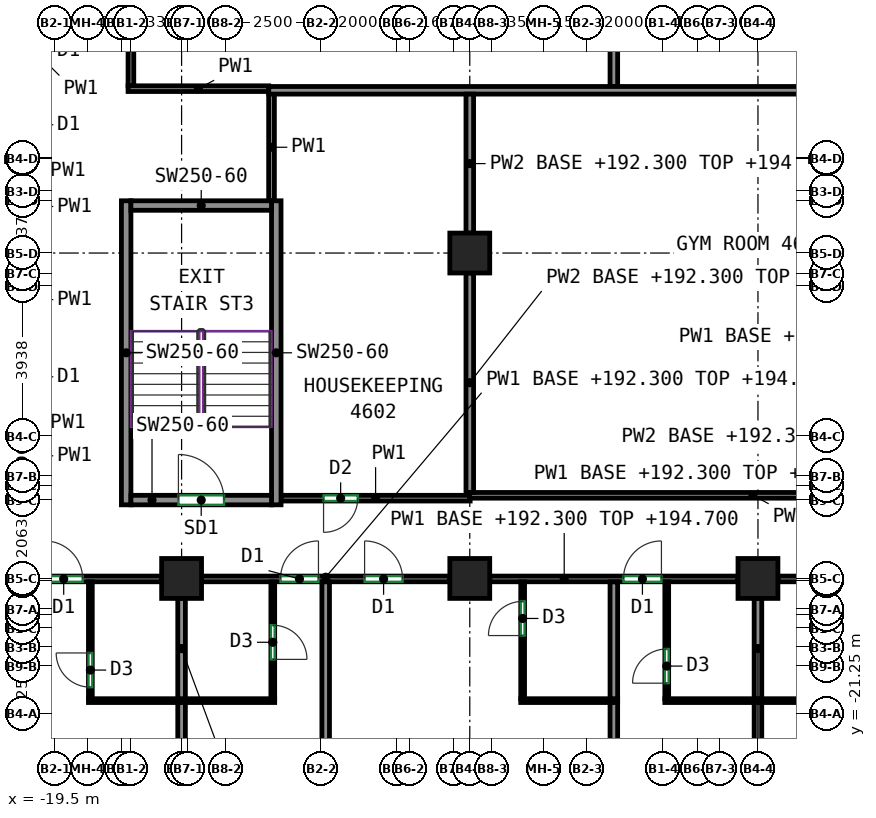
"""IFC4 building model, lengths in metres.
Left out: names, types, materials, properties, quantities, classifications, styles, units other than length and angle.
Written with IfcOpenShell. Run it as: python <this file> out.ifc"""

import sys

from ifc_helpers import new_model, si_unit, direction, frame, frame_2d, origin, origin_2d, place, context, subcontext, project, spatial, rectangle, extrude, source, transform, mapped, element, fill, save


model = new_model("IFC4")
c1 = context("Model", 3, precision=1e-05, world=origin(), true_north=direction((0.0, 1.0)))
c2 = subcontext(c1, "Body", "Model", "MODEL_VIEW")
j1 = project(units=[si_unit("LENGTHUNIT", "METRE"), si_unit("PLANEANGLEUNIT", "RADIAN")], contexts=[c1])
p1 = place(None, origin())
s1 = spatial("IfcSite", under=j1, at=p1, CompositionType="ELEMENT")
p2 = place(p1, origin())
s2 = spatial("IfcBuilding", under=s1, at=p2, CompositionType="ELEMENT")
p3 = place(p2, frame((0.0, 0.0, 192.3)))
s3 = spatial("IfcBuildingStorey", under=s2, at=p3, CompositionType="ELEMENT", Elevation=192.3)
m1 = source(origin(), c2, "Body", "SweptSolid", [
    extrude(rectangle(XDim=1.05, YDim=1.05, at=origin_2d()), origin(), (0.0, 0.0, 1.0), 3.0),
])
for number, where, z_axis, x_axis in (
    (1, (-16.167, -17.688, 0.0), (0.0, 0.0, 1.0), (1.0, 0.0, 0.0)),
    (2, (-8.583, -17.688, 0.0), (0.0, 0.0, 1.0), (1.0, 0.0, 0.0)),
    (3, (-8.583, -9.125, 0.0), (0.0, 0.0, 1.0), (1.0, 0.0, 0.0)),
    (4, (-1.0, -17.688, 0.0), (0.0, 0.0, 1.0), (1.0, 0.0, 0.0)),
):
    element("IfcColumn", number, at=place(p3, frame(where, z_axis=z_axis, x_axis=x_axis)), inside=s3, PredefinedType="COLUMN", context=c2, shape_type="MappedRepresentation", body=[
        mapped(m1, transform((0.0, 0.0, 0.0))),
    ])
m2 = source(origin(), c2, "Body", "SweptSolid", [
    extrude(rectangle(XDim=8.0, YDim=0.25, at=frame_2d((4.0, 0.0))), origin(), (0.0, 0.0, 1.0), 3.0),
])
for number, where, z_axis, x_axis in (
    (5, (-17.625, -15.75, 0.0), (0.0, 0.0, 1.0), (0.0, 1.0, 0.0)),
    (6, (-13.675, -15.75, 0.0), (0.0, 0.0, 1.0), (0.0, 1.0, 0.0)),
):
    element("IfcWall", number, at=place(p3, frame(where, z_axis=z_axis, x_axis=x_axis)), inside=s3, PredefinedType="SHEAR", context=c2, shape_type="MappedRepresentation", body=[
        mapped(m2, transform((0.0, 0.0, 0.0))),
    ])
m3 = source(origin(), c2, "Body", "SweptSolid", [
    extrude(rectangle(XDim=3.7, YDim=0.25, at=frame_2d((1.85, 0.0))), origin(), (0.0, 0.0, 1.0), 3.0),
])
p4 = place(p3, frame((-17.5, -15.625, 0.0), z_axis=(0.0, 0.0, 1.0), x_axis=(1.0, 0.0, 0.0)))
e7 = element("IfcWall", 7, at=p4, inside=s3, PredefinedType="SHEAR", context=c2, shape_type="MappedRepresentation", body=[
    mapped(m3, transform((0.0, 0.0, 0.0))),
])
p5 = place(p4, frame((1.25, 0.0, 0.0)))
e8 = element("IfcOpeningElement", 8, at=p5, cuts=e7, PredefinedType="OPENING", context=c2, shape_type="SweptSolid", body=[
    extrude(rectangle(XDim=1.2, YDim=2.1, at=frame_2d((0.6, 1.05))), frame((0.0, 0.135, 0.0), z_axis=(0.0, -1.0, 0.0), x_axis=(1.0, 0.0, 0.0)), (0.0, 0.0, 1.0), 0.27),
])
p6 = place(p3, frame((-17.5, -7.875, 0.0), z_axis=(0.0, 0.0, 1.0), x_axis=(1.0, 0.0, 0.0)))
e9 = element("IfcWall", 9, at=p6, inside=s3, PredefinedType="SHEAR", context=c2, shape_type="MappedRepresentation", body=[
    mapped(m3, transform((0.0, 0.0, 0.0))),
])
p7 = place(p3, frame((-23.75, -17.7, 0.0), z_axis=(0.0, 0.0, 1.0), x_axis=(1.0, 0.0, 0.0)))
e10 = element("IfcWall", 10, at=p7, inside=s3, PredefinedType="PARTITIONING", context=c2, shape_type="SweptSolid", body=[
    extrude(rectangle(XDim=7.058, YDim=0.15, at=frame_2d((3.529, 0.0))), origin(), (0.0, 0.0, 1.0), 2.4),
])
p8 = place(p7, frame((0.201, 0.0, 0.0)))
e11 = element("IfcOpeningElement", 11, at=p8, cuts=e10, PredefinedType="OPENING", context=c2, shape_type="SweptSolid", body=[
    extrude(rectangle(XDim=1.0, YDim=2.1, at=frame_2d((0.5, 1.05))), frame((0.0, 0.085, 0.0), z_axis=(0.0, -1.0, 0.0), x_axis=(1.0, 0.0, 0.0)), (0.0, 0.0, 1.0), 0.17),
])
p9 = place(p7, frame((3.981, 0.0, 0.0)))
e12 = element("IfcOpeningElement", 12, at=p9, cuts=e10, PredefinedType="OPENING", context=c2, shape_type="SweptSolid", body=[
    extrude(rectangle(XDim=1.0, YDim=2.1, at=frame_2d((0.5, 1.05))), frame((0.0, 0.085, 0.0), z_axis=(0.0, -1.0, 0.0), x_axis=(1.0, 0.0, 0.0)), (0.0, 0.0, 1.0), 0.17),
])
p10 = place(p3, frame((-15.642, -17.7, 0.0), z_axis=(0.0, 0.0, 1.0), x_axis=(1.0, 0.0, 0.0)))
e13 = element("IfcWall", 13, at=p10, inside=s3, PredefinedType="PARTITIONING", context=c2, shape_type="SweptSolid", body=[
    extrude(rectangle(XDim=6.534, YDim=0.15, at=frame_2d((3.267, 0.0))), origin(), (0.0, 0.0, 1.0), 2.4),
])
p11 = place(p10, frame((2.077, 0.0, 0.0)))
e14 = element("IfcOpeningElement", 14, at=p11, cuts=e13, PredefinedType="OPENING", context=c2, shape_type="SweptSolid", body=[
    extrude(rectangle(XDim=1.0, YDim=2.1, at=frame_2d((0.5, 1.05))), frame((0.0, 0.085, 0.0), z_axis=(0.0, -1.0, 0.0), x_axis=(1.0, 0.0, 0.0)), (0.0, 0.0, 1.0), 0.17),
])
p12 = place(p10, frame((4.291, 0.0, 0.0)))
e15 = element("IfcOpeningElement", 15, at=p12, cuts=e13, PredefinedType="OPENING", context=c2, shape_type="SweptSolid", body=[
    extrude(rectangle(XDim=1.0, YDim=2.1, at=frame_2d((0.5, 1.05))), frame((0.0, 0.085, 0.0), z_axis=(0.0, -1.0, 0.0), x_axis=(1.0, 0.0, 0.0)), (0.0, 0.0, 1.0), 0.17),
])
p13 = place(p3, frame((-8.058, -17.7, 0.0), z_axis=(0.0, 0.0, 1.0), x_axis=(1.0, 0.0, 0.0)))
e16 = element("IfcWall", 16, at=p13, inside=s3, PredefinedType="PARTITIONING", context=c2, shape_type="SweptSolid", body=[
    extrude(rectangle(XDim=6.533, YDim=0.15, at=frame_2d((3.267, 0.0))), origin(), (0.0, 0.0, 1.0), 2.4),
])
p14 = place(p13, frame((3.518, 0.0, 0.0)))
e17 = element("IfcOpeningElement", 17, at=p14, cuts=e16, PredefinedType="OPENING", context=c2, shape_type="SweptSolid", body=[
    extrude(rectangle(XDim=1.0, YDim=2.1, at=frame_2d((0.5, 1.05))), frame((0.0, 0.085, 0.0), z_axis=(0.0, -1.0, 0.0), x_axis=(1.0, 0.0, 0.0)), (0.0, 0.0, 1.0), 0.17),
])
p15 = place(p3, frame((-0.475, -17.7, 0.0), z_axis=(0.0, 0.0, 1.0), x_axis=(1.0, 0.0, 0.0)))
e18 = element("IfcWall", 18, at=p15, inside=s3, PredefinedType="PARTITIONING", context=c2, shape_type="SweptSolid", body=[
    extrude(rectangle(XDim=6.533, YDim=0.15, at=frame_2d((3.267, 0.0))), origin(), (0.0, 0.0, 1.0), 2.4),
])
p16 = place(p15, frame((2.147, 0.0, 0.0)))
e19 = element("IfcOpeningElement", 19, at=p16, cuts=e18, PredefinedType="OPENING", context=c2, shape_type="SweptSolid", body=[
    extrude(rectangle(XDim=1.0, YDim=2.1, at=frame_2d((0.5, 1.05))), frame((0.0, 0.085, 0.0), z_axis=(0.0, -1.0, 0.0), x_axis=(1.0, 0.0, 0.0)), (0.0, 0.0, 1.0), 0.17),
])
p17 = place(p15, frame((3.468, 0.0, 0.0)))
e20 = element("IfcOpeningElement", 20, at=p17, cuts=e18, PredefinedType="OPENING", context=c2, shape_type="SweptSolid", body=[
    extrude(rectangle(XDim=1.0, YDim=2.1, at=frame_2d((0.5, 1.05))), frame((0.0, 0.085, 0.0), z_axis=(0.0, -1.0, 0.0), x_axis=(1.0, 0.0, 0.0)), (0.0, 0.0, 1.0), 0.17),
])
p18 = place(p3, frame((-17.5, -4.725, 0.0), z_axis=(0.0, 0.0, 1.0), x_axis=(0.0, 1.0, 0.0)))
e21 = element("IfcWall", 21, at=p18, inside=s3, PredefinedType="PARTITIONING", context=c2, shape_type="SweptSolid", body=[
    extrude(rectangle(XDim=8.35, YDim=0.15, at=frame_2d((4.175, 0.0))), origin(), (0.0, 0.0, 1.0), 3.0),
])
p19 = place(p3, frame((-17.575, -4.8, 0.0), z_axis=(0.0, 0.0, 1.0), x_axis=(1.0, 0.0, 0.0)))
e22 = element("IfcWall", 22, at=p19, inside=s3, PredefinedType="PARTITIONING", context=c2, shape_type="SweptSolid", body=[
    extrude(rectangle(XDim=3.702, YDim=0.15, at=frame_2d((1.851, 0.0))), origin(), (0.0, 0.0, 1.0), 3.0),
])
p20 = place(p3, frame((-13.8, -7.75, 0.0), z_axis=(0.0, 0.0, 1.0), x_axis=(0.0, 1.0, 0.0)))
e23 = element("IfcWall", 23, at=p20, inside=s3, PredefinedType="PARTITIONING", context=c2, shape_type="SweptSolid", body=[
    extrude(rectangle(XDim=2.817, YDim=0.15, at=frame_2d((1.408, 0.0))), origin(), (0.0, 0.0, 1.0), 3.0),
])
p21 = place(p3, frame((-8.573, -15.575, 0.0), z_axis=(0.0, 0.0, 1.0), x_axis=(-1.0, 0.0, 0.0)))
e24 = element("IfcWall", 24, at=p21, inside=s3, PredefinedType="PARTITIONING", context=c2, shape_type="SweptSolid", body=[
    extrude(rectangle(XDim=4.977, YDim=0.15, at=frame_2d((2.489, 0.0))), origin(), (0.0, 0.0, 1.0), 3.0),
])
p22 = place(p21, frame((2.958, 0.0, 0.0)))
e25 = element("IfcOpeningElement", 25, at=p22, cuts=e24, PredefinedType="OPENING", context=c2, shape_type="SweptSolid", body=[
    extrude(rectangle(XDim=0.9, YDim=2.1, at=frame_2d((0.45, 1.05))), frame((0.0, 0.085, 0.0), z_axis=(0.0, -1.0, 0.0), x_axis=(1.0, 0.0, 0.0)), (0.0, 0.0, 1.0), 0.17),
])
p23 = place(p3, frame((-8.593, -15.5, 0.0), z_axis=(0.0, 0.0, 1.0), x_axis=(1.0, 0.0, 0.0)))
e26 = element("IfcWall", 26, at=p23, inside=s3, PredefinedType="PARTITIONING", context=c2, shape_type="SweptSolid", body=[
    extrude(rectangle(XDim=24.868, YDim=0.15, at=frame_2d((12.434, 0.0))), origin(), (0.0, 0.0, 1.0), 3.0),
])
p24 = place(p23, frame((11.973, 0.0, 0.0)))
e27 = element("IfcOpeningElement", 27, at=p24, cuts=e26, PredefinedType="OPENING", context=c2, shape_type="SweptSolid", body=[
    extrude(rectangle(XDim=0.9, YDim=2.1, at=frame_2d((0.45, 1.05))), frame((0.0, 0.085, 0.0), z_axis=(0.0, -1.0, 0.0), x_axis=(1.0, 0.0, 0.0)), (0.0, 0.0, 1.0), 0.17),
])
p25 = place(p3, frame((-18.567, -20.852, 0.0), z_axis=(0.0, 0.0, 1.0), x_axis=(0.0, 1.0, 0.0)))
e28 = element("IfcWall", 28, at=p25, inside=s3, PredefinedType="PARTITIONING", context=c2, shape_type="SweptSolid", body=[
    extrude(rectangle(XDim=3.075, YDim=0.1, at=frame_2d((1.538, 0.0))), origin(), (0.0, 0.0, 1.0), 3.0),
])
p26 = place(p25, frame((0.304, 0.0, 0.0)))
e29 = element("IfcOpeningElement", 29, at=p26, cuts=e28, PredefinedType="OPENING", context=c2, shape_type="SweptSolid", body=[
    extrude(rectangle(XDim=0.9, YDim=2.1, at=frame_2d((0.45, 1.05))), frame((0.0, 0.06, 0.0), z_axis=(0.0, -1.0, 0.0), x_axis=(1.0, 0.0, 0.0)), (0.0, 0.0, 1.0), 0.12),
])
p27 = place(p3, frame((-18.617, -20.902, 0.0), z_axis=(0.0, 0.0, 1.0), x_axis=(1.0, 0.0, 0.0)))
e30 = element("IfcWall", 30, at=p27, inside=s3, PredefinedType="PARTITIONING", context=c2, shape_type="SweptSolid", body=[
    extrude(rectangle(XDim=4.9, YDim=0.1, at=frame_2d((2.45, 0.0))), origin(), (0.0, 0.0, 1.0), 3.0),
])
p28 = place(p3, frame((-16.167, -25.4, 0.0), z_axis=(0.0, 0.0, 1.0), x_axis=(0.0, 1.0, 0.0)))
e31 = element("IfcWall", 31, at=p28, inside=s3, PredefinedType="PARTITIONING", context=c2, shape_type="SweptSolid", body=[
    extrude(rectangle(XDim=4.448, YDim=0.2, at=frame_2d((2.224, 0.0))), origin(), (0.0, 0.0, 1.0), 2.4),
])
p29 = place(p3, frame((-16.167, -20.852, 0.0), z_axis=(0.0, 0.0, 1.0), x_axis=(0.0, 1.0, 0.0)))
e32 = element("IfcWall", 32, at=p29, inside=s3, PredefinedType="PARTITIONING", context=c2, shape_type="SweptSolid", body=[
    extrude(rectangle(XDim=2.64, YDim=0.2, at=frame_2d((1.32, 0.0))), origin(), (0.0, 0.0, 1.0), 2.4),
])
p30 = place(p3, frame((-13.767, -17.777, 0.0), z_axis=(0.0, 0.0, 1.0), x_axis=(0.0, -1.0, 0.0)))
e33 = element("IfcWall", 33, at=p30, inside=s3, PredefinedType="PARTITIONING", context=c2, shape_type="SweptSolid", body=[
    extrude(rectangle(XDim=3.075, YDim=0.1, at=frame_2d((1.538, 0.0))), origin(), (0.0, 0.0, 1.0), 3.0),
])
p31 = place(p30, frame((1.14, 0.0, 0.0)))
e34 = element("IfcOpeningElement", 34, at=p31, cuts=e33, PredefinedType="OPENING", context=c2, shape_type="SweptSolid", body=[
    extrude(rectangle(XDim=0.9, YDim=2.1, at=frame_2d((0.45, 1.05))), frame((0.0, 0.06, 0.0), z_axis=(0.0, -1.0, 0.0), x_axis=(1.0, 0.0, 0.0)), (0.0, 0.0, 1.0), 0.12),
])
p32 = place(p3, frame((-12.375, -26.0, 0.0), z_axis=(0.0, 0.0, 1.0), x_axis=(0.0, 1.0, 0.0)))
e35 = element("IfcWall", 35, at=p32, inside=s3, PredefinedType="PARTITIONING", context=c2, shape_type="SweptSolid", body=[
    extrude(rectangle(XDim=8.223, YDim=0.2, at=frame_2d((4.111, 0.0))), origin(), (0.0, 0.0, 1.0), 3.0),
])
p33 = place(p3, frame((-7.192, -20.852, 0.0), z_axis=(0.0, 0.0, 1.0), x_axis=(0.0, 1.0, 0.0)))
e36 = element("IfcWall", 36, at=p33, inside=s3, PredefinedType="PARTITIONING", context=c2, shape_type="SweptSolid", body=[
    extrude(rectangle(XDim=3.075, YDim=0.1, at=frame_2d((1.538, 0.0))), origin(), (0.0, 0.0, 1.0), 3.0),
])
p34 = place(p33, frame((1.662, 0.0, 0.0)))
e37 = element("IfcOpeningElement", 37, at=p34, cuts=e36, PredefinedType="OPENING", context=c2, shape_type="SweptSolid", body=[
    extrude(rectangle(XDim=0.9, YDim=2.1, at=frame_2d((0.45, 1.05))), frame((0.0, 0.06, 0.0), z_axis=(0.0, -1.0, 0.0), x_axis=(1.0, 0.0, 0.0)), (0.0, 0.0, 1.0), 0.12),
])
p35 = place(p3, frame((-7.242, -20.902, 0.0), z_axis=(0.0, 0.0, 1.0), x_axis=(1.0, 0.0, 0.0)))
e38 = element("IfcWall", 38, at=p35, inside=s3, PredefinedType="PARTITIONING", context=c2, shape_type="SweptSolid", body=[
    extrude(rectangle(XDim=2.55, YDim=0.1, at=frame_2d((1.275, 0.0))), origin(), (0.0, 0.0, 1.0), 3.0),
])
p36 = place(p3, frame((-4.792, -26.0, 0.0), z_axis=(0.0, 0.0, 1.0), x_axis=(0.0, 1.0, 0.0)))
e39 = element("IfcWall", 39, at=p36, inside=s3, PredefinedType="PARTITIONING", context=c2, shape_type="SweptSolid", body=[
    extrude(rectangle(XDim=5.048, YDim=0.2, at=frame_2d((2.524, 0.0))), origin(), (0.0, 0.0, 1.0), 3.0),
])
p37 = place(p3, frame((-4.792, -20.852, 0.0), z_axis=(0.0, 0.0, 1.0), x_axis=(0.0, 1.0, 0.0)))
e40 = element("IfcWall", 40, at=p37, inside=s3, PredefinedType="PARTITIONING", context=c2, shape_type="SweptSolid", body=[
    extrude(rectangle(XDim=3.075, YDim=0.2, at=frame_2d((1.538, 0.0))), origin(), (0.0, 0.0, 1.0), 3.0),
])
p38 = place(p3, frame((-3.4, -20.852, 0.0), z_axis=(0.0, 0.0, 1.0), x_axis=(0.0, 1.0, 0.0)))
e41 = element("IfcWall", 41, at=p38, inside=s3, PredefinedType="PARTITIONING", context=c2, shape_type="SweptSolid", body=[
    extrude(rectangle(XDim=3.075, YDim=0.1, at=frame_2d((1.538, 0.0))), origin(), (0.0, 0.0, 1.0), 3.0),
])
p39 = place(p38, frame((0.409, 0.0, 0.0)))
e42 = element("IfcOpeningElement", 42, at=p39, cuts=e41, PredefinedType="OPENING", context=c2, shape_type="SweptSolid", body=[
    extrude(rectangle(XDim=0.9, YDim=2.1, at=frame_2d((0.45, 1.05))), frame((0.0, 0.06, 0.0), z_axis=(0.0, -1.0, 0.0), x_axis=(1.0, 0.0, 0.0)), (0.0, 0.0, 1.0), 0.12),
])
p40 = place(p3, frame((-3.45, -20.902, 0.0), z_axis=(0.0, 0.0, 1.0), x_axis=(1.0, 0.0, 0.0)))
e43 = element("IfcWall", 43, at=p40, inside=s3, PredefinedType="PARTITIONING", context=c2, shape_type="SweptSolid", body=[
    extrude(rectangle(XDim=4.9, YDim=0.1, at=frame_2d((2.45, 0.0))), origin(), (0.0, 0.0, 1.0), 3.0),
])
p41 = place(p3, frame((-1.0, -25.4, 0.0), z_axis=(0.0, 0.0, 1.0), x_axis=(0.0, 1.0, 0.0)))
e44 = element("IfcWall", 44, at=p41, inside=s3, PredefinedType="PARTITIONING", context=c2, shape_type="SweptSolid", body=[
    extrude(rectangle(XDim=4.448, YDim=0.2, at=frame_2d((2.224, 0.0))), origin(), (0.0, 0.0, 1.0), 2.4),
])
p42 = place(p3, frame((-1.0, -20.852, 0.0), z_axis=(0.0, 0.0, 1.0), x_axis=(0.0, 1.0, 0.0)))
e45 = element("IfcWall", 45, at=p42, inside=s3, PredefinedType="PARTITIONING", context=c2, shape_type="SweptSolid", body=[
    extrude(rectangle(XDim=2.64, YDim=0.2, at=frame_2d((1.32, 0.0))), origin(), (0.0, 0.0, 1.0), 2.4),
])
p43 = place(p3, frame((-4.792, -4.743, 0.0), z_axis=(0.0, 0.0, 1.0), x_axis=(0.0, 1.0, 0.0)))
e46 = element("IfcWall", 46, at=p43, inside=s3, PredefinedType="PARTITIONING", context=c2, shape_type="SweptSolid", body=[
    extrude(rectangle(XDim=8.366, YDim=0.2, at=frame_2d((4.183, 0.0))), origin(), (0.0, 0.0, 1.0), 3.0),
])
p44 = place(p3, frame((-13.873, -4.843, 0.0), z_axis=(0.0, 0.0, 1.0), x_axis=(1.0, 0.0, 0.0)))
e47 = element("IfcWall", 47, at=p44, inside=s3, PredefinedType="PARTITIONING", context=c2, shape_type="SweptSolid", body=[
    extrude(rectangle(XDim=30.146, YDim=0.2, at=frame_2d((15.073, 0.0))), origin(), (0.0, 0.0, 1.0), 3.0),
])
p45 = place(p3, frame((-8.583, -8.6, 0.0), z_axis=(0.0, 0.0, 1.0), x_axis=(0.0, 1.0, 0.0)))
e48 = element("IfcWall", 48, at=p45, inside=s3, PredefinedType="PARTITIONING", context=c2, shape_type="SweptSolid", body=[
    extrude(rectangle(XDim=3.657, YDim=0.2, at=frame_2d((1.829, 0.0))), origin(), (0.0, 0.0, 1.0), 2.4),
])
p46 = place(p3, frame((-8.583, -15.423, 0.0), z_axis=(0.0, 0.0, 1.0), x_axis=(0.0, 1.0, 0.0)))
e49 = element("IfcWall", 49, at=p46, inside=s3, PredefinedType="PARTITIONING", context=c2, shape_type="SweptSolid", body=[
    extrude(rectangle(XDim=5.773, YDim=0.2, at=frame_2d((2.887, 0.0))), origin(), (0.0, 0.0, 1.0), 2.4),
])
p47 = place(p5, origin())
e50 = element("IfcDoor", 50, at=p47, inside=s3, OperationType="DOUBLE_DOOR_SINGLE_SWING", PredefinedType="DOOR", context=c2, shape_type="SweptSolid", body=[
    extrude(rectangle(XDim=1.2, YDim=2.1, at=frame_2d((0.6, 1.05))), frame((0.0, 0.025, 0.0), z_axis=(0.0, -1.0, 0.0), x_axis=(1.0, 0.0, 0.0)), (0.0, 0.0, 1.0), 0.05),
])
fill(e8, e50)
p48 = place(p26, origin())
e51 = element("IfcDoor", 51, at=p48, inside=s3, OperationType="SINGLE_SWING_RIGHT", PredefinedType="DOOR", context=c2, shape_type="SweptSolid", body=[
    extrude(rectangle(XDim=0.9, YDim=2.1, at=frame_2d((0.45, 1.05))), frame((0.0, 0.025, 0.0), z_axis=(0.0, -1.0, 0.0), x_axis=(1.0, 0.0, 0.0)), (0.0, 0.0, 1.0), 0.05),
])
fill(e29, e51)
p49 = place(p39, origin())
e52 = element("IfcDoor", 52, at=p49, inside=s3, OperationType="SINGLE_SWING_LEFT", PredefinedType="DOOR", context=c2, shape_type="SweptSolid", body=[
    extrude(rectangle(XDim=0.9, YDim=2.1, at=frame_2d((0.45, 1.05))), frame((0.0, 0.025, 0.0), z_axis=(0.0, -1.0, 0.0), x_axis=(1.0, 0.0, 0.0)), (0.0, 0.0, 1.0), 0.05),
])
fill(e42, e52)
p50 = place(p31, origin())
e53 = element("IfcDoor", 53, at=p50, inside=s3, OperationType="SINGLE_SWING_RIGHT", PredefinedType="DOOR", context=c2, shape_type="SweptSolid", body=[
    extrude(rectangle(XDim=0.9, YDim=2.1, at=frame_2d((0.45, 1.05))), frame((0.0, 0.025, 0.0), z_axis=(0.0, -1.0, 0.0), x_axis=(1.0, 0.0, 0.0)), (0.0, 0.0, 1.0), 0.05),
])
fill(e34, e53)
p51 = place(p34, origin())
e54 = element("IfcDoor", 54, at=p51, inside=s3, OperationType="SINGLE_SWING_LEFT", PredefinedType="DOOR", context=c2, shape_type="SweptSolid", body=[
    extrude(rectangle(XDim=0.9, YDim=2.1, at=frame_2d((0.45, 1.05))), frame((0.0, 0.025, 0.0), z_axis=(0.0, -1.0, 0.0), x_axis=(1.0, 0.0, 0.0)), (0.0, 0.0, 1.0), 0.05),
])
fill(e37, e54)
p52 = place(p9, origin())
e55 = element("IfcDoor", 55, at=p52, inside=s3, OperationType="SINGLE_SWING_LEFT", PredefinedType="DOOR", context=c2, shape_type="SweptSolid", body=[
    extrude(rectangle(XDim=1.0, YDim=2.1, at=frame_2d((0.5, 1.05))), frame((0.0, 0.025, 0.0), z_axis=(0.0, -1.0, 0.0), x_axis=(1.0, 0.0, 0.0)), (0.0, 0.0, 1.0), 0.05),
])
fill(e12, e55)
p53 = place(p11, origin())
e56 = element("IfcDoor", 56, at=p53, inside=s3, OperationType="SINGLE_SWING_RIGHT", PredefinedType="DOOR", context=c2, shape_type="SweptSolid", body=[
    extrude(rectangle(XDim=1.0, YDim=2.1, at=frame_2d((0.5, 1.05))), frame((0.0, 0.025, 0.0), z_axis=(0.0, -1.0, 0.0), x_axis=(1.0, 0.0, 0.0)), (0.0, 0.0, 1.0), 0.05),
])
fill(e14, e56)
p54 = place(p12, origin())
e57 = element("IfcDoor", 57, at=p54, inside=s3, OperationType="SINGLE_SWING_LEFT", PredefinedType="DOOR", context=c2, shape_type="SweptSolid", body=[
    extrude(rectangle(XDim=1.0, YDim=2.1, at=frame_2d((0.5, 1.05))), frame((0.0, 0.025, 0.0), z_axis=(0.0, -1.0, 0.0), x_axis=(1.0, 0.0, 0.0)), (0.0, 0.0, 1.0), 0.05),
])
fill(e15, e57)
p55 = place(p14, origin())
e58 = element("IfcDoor", 58, at=p55, inside=s3, OperationType="SINGLE_SWING_RIGHT", PredefinedType="DOOR", context=c2, shape_type="SweptSolid", body=[
    extrude(rectangle(XDim=1.0, YDim=2.1, at=frame_2d((0.5, 1.05))), frame((0.0, 0.025, 0.0), z_axis=(0.0, -1.0, 0.0), x_axis=(1.0, 0.0, 0.0)), (0.0, 0.0, 1.0), 0.05),
])
fill(e17, e58)
p56 = place(p22, origin())
e59 = element("IfcDoor", 59, at=p56, inside=s3, OperationType="SINGLE_SWING_RIGHT", PredefinedType="DOOR", context=c2, shape_type="SweptSolid", body=[
    extrude(rectangle(XDim=0.9, YDim=2.1, at=frame_2d((0.45, 1.05))), frame((0.0, 0.025, 0.0), z_axis=(0.0, -1.0, 0.0), x_axis=(1.0, 0.0, 0.0)), (0.0, 0.0, 1.0), 0.05),
])
fill(e25, e59)
save(model, sys.argv[1])
